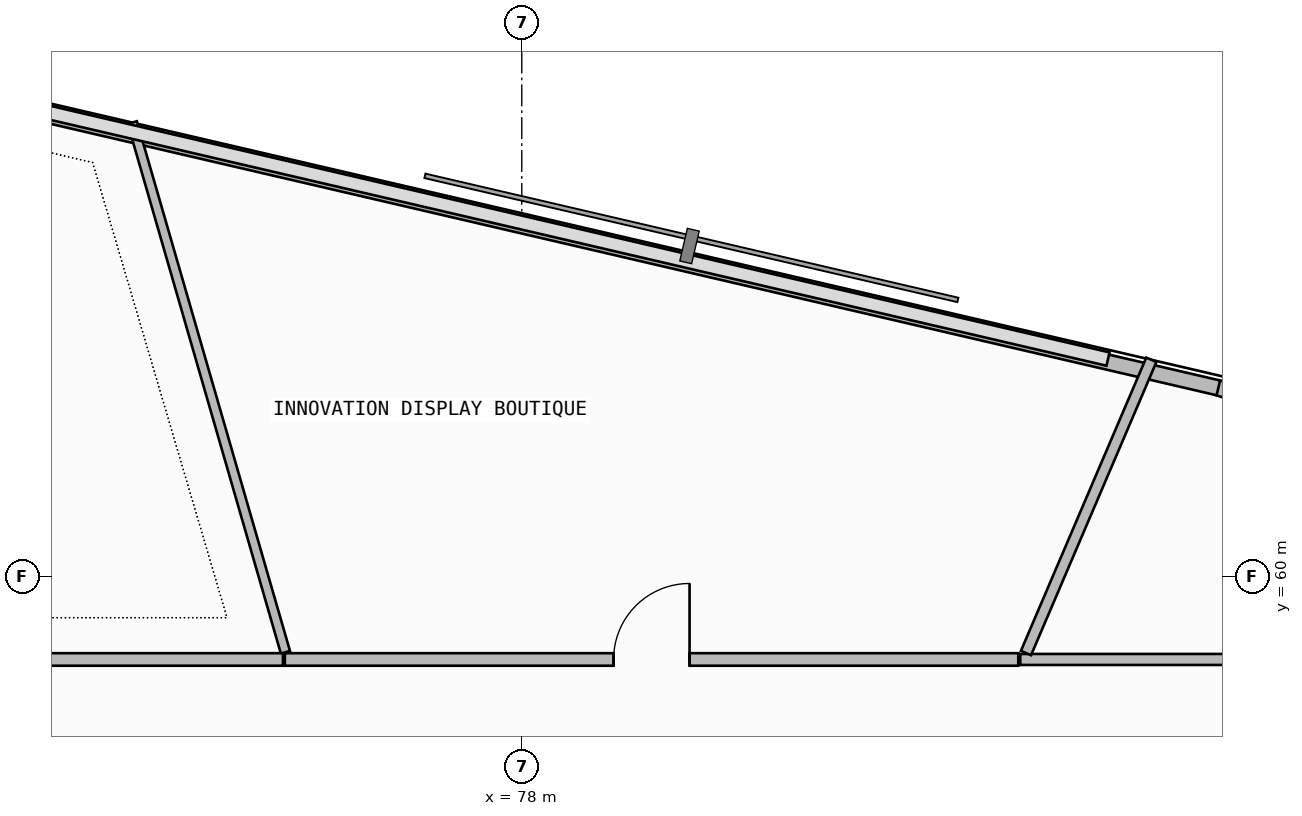
"""IFC4 building model, lengths in metres.
Left out: names, types, materials, properties, quantities, classifications, styles, units other than length and angle.
Written with IfcOpenShell. Run it as: python <this file> out.ifc"""

import sys

from ifc_helpers import new_model, si_unit, direction, frame, frame_2d, origin, place, context, subcontext, project, spatial, rectangle, extrude, element, fill, save


model = new_model("IFC4")
c1 = context("Model", 3, precision=1e-05, world=origin(), true_north=direction((0.0, 1.0)))
c2 = subcontext(c1, "Body", "Model", "MODEL_VIEW")
j1 = project(units=[si_unit("LENGTHUNIT", "METRE"), si_unit("PLANEANGLEUNIT", "RADIAN")], contexts=[c1])
p1 = place(None, origin())
s1 = spatial("IfcSite", under=j1, at=p1, CompositionType="ELEMENT")
p2 = place(p1, origin())
s2 = spatial("IfcBuilding", under=s1, at=p2, CompositionType="ELEMENT")
p3 = place(p2, frame((0.0, 0.0, 171.9)))
s3 = spatial("IfcBuildingStorey", under=s2, at=p3, CompositionType="ELEMENT", Elevation=171.9)
p4 = place(p3, frame((117.363, 52.344, 0.0), z_axis=(0.0, 0.0, 1.0), x_axis=(-0.94800468727, 0.31825636351, 0.0)))
e1 = element("IfcWall", 1, at=p4, inside=s3, PredefinedType="PARAPET", context=c2, shape_type="SweptSolid", body=[
    extrude(rectangle(XDim=31.869, YDim=0.2, at=frame_2d((15.935, 0.0))), origin(), (0.0, 0.0, 1.0), 1.15),
])
p5 = place(p3, frame((87.165, 62.482, 0.0), z_axis=(0.0, 0.0, 1.0), x_axis=(-0.973958631559, 0.226725790352, 0.0)))
e2 = element("IfcWall", 2, at=p5, inside=s3, PredefinedType="PARAPET", context=c2, shape_type="SweptSolid", body=[
    extrude(rectangle(XDim=27.376, YDim=0.2, at=frame_2d((13.688, 0.0))), origin(), (0.0, 0.0, 1.0), 1.15),
])
p6 = place(p3, frame((91.703, 58.909, 0.0), z_axis=(0.0, 0.0, 1.0), x_axis=(-1.0, 0.0, 0.0)))
e3 = element("IfcWall", 3, at=p6, inside=s3, PredefinedType="PARTITIONING", context=c2, shape_type="SweptSolid", body=[
    extrude(rectangle(XDim=7.145, YDim=0.145, at=frame_2d((3.572, 0.0))), origin(), (0.0, 0.0, 1.0), 2.825),
])
p7 = place(p6, frame((3.122, 0.0, 0.0)))
e4 = element("IfcOpeningElement", 4, at=p7, cuts=e3, PredefinedType="OPENING", context=c2, shape_type="SweptSolid", body=[
    extrude(rectangle(XDim=0.9, YDim=2.1, at=frame_2d((0.45, 1.05))), frame((0.0, 0.083, 0.0), z_axis=(0.0, -1.0, 0.0), x_axis=(1.0, 0.0, 0.0)), (0.0, 0.0, 1.0), 0.165),
])
p8 = place(p3, frame((84.634, 58.993, 0.0), z_axis=(0.0, 0.0, 1.0), x_axis=(0.393097529565, 0.919496782077, 0.0)))
e5 = element("IfcWall", 5, at=p8, inside=s3, PredefinedType="PARTITIONING", context=c2, shape_type="SweptSolid", body=[
    extrude(rectangle(XDim=4.196, YDim=0.145, at=frame_2d((2.098, 0.0))), origin(), (0.0, 0.0, 1.0), 3.34),
])
p9 = place(p3, frame((84.532, 58.909, 0.0), z_axis=(0.0, 0.0, 1.0), x_axis=(-1.0, 0.0, 0.0)))
e6 = element("IfcWall", 6, at=p9, inside=s3, PredefinedType="PARTITIONING", context=c2, shape_type="SweptSolid", body=[
    extrude(rectangle(XDim=9.65, YDim=0.165, at=frame_2d((4.825, 0.0))), origin(), (0.0, 0.0, 1.0), 3.34),
])
p10 = place(p9, frame((4.325, 0.0, 0.0)))
e7 = element("IfcOpeningElement", 7, at=p10, cuts=e6, PredefinedType="OPENING", context=c2, shape_type="SweptSolid", body=[
    extrude(rectangle(XDim=1.0, YDim=2.2, at=frame_2d((0.5, 1.1))), frame((0.0, 0.093, 0.0), z_axis=(0.0, -1.0, 0.0), x_axis=(1.0, 0.0, 0.0)), (0.0, 0.0, 1.0), 0.185),
])
p11 = place(p3, frame((74.89, 59.003, 0.0), z_axis=(0.0, 0.0, 1.0), x_axis=(-0.277684607066, 0.960672295322, 0.0)))
e8 = element("IfcWall", 8, at=p11, inside=s3, PredefinedType="PARTITIONING", context=c2, shape_type="SweptSolid", body=[
    extrude(rectangle(XDim=7.254, YDim=0.125, at=frame_2d((3.627, 0.0))), origin(), (0.0, 0.0, 1.0), 3.34),
])
p12 = place(p3, frame((74.858, 58.909, 0.0), z_axis=(0.0, 0.0, 1.0), x_axis=(-1.0, 0.0, 0.0)))
e9 = element("IfcWall", 9, at=p12, inside=s3, PredefinedType="PARTITIONING", context=c2, shape_type="SweptSolid", body=[
    extrude(rectangle(XDim=5.375, YDim=0.165, at=frame_2d((2.687, 0.0))), origin(), (0.0, 0.0, 1.0), 2.825),
])
p13 = place(p10, frame((1.0, 0.0, 0.0), z_axis=(0.0, 0.0, 1.0), x_axis=(-1.0, 0.0, 0.0)))
e10 = element("IfcDoor", 10, at=p13, inside=s3, OperationType="SINGLE_SWING_RIGHT", PredefinedType="DOOR", context=c2, shape_type="SweptSolid", body=[
    extrude(rectangle(XDim=1.0, YDim=2.2, at=frame_2d((0.5, 1.1))), frame((0.0, 0.025, 0.0), z_axis=(0.0, -1.0, 0.0), x_axis=(1.0, 0.0, 0.0)), (0.0, 0.0, 1.0), 0.05),
])
fill(e7, e10)
save(model, sys.argv[1])
